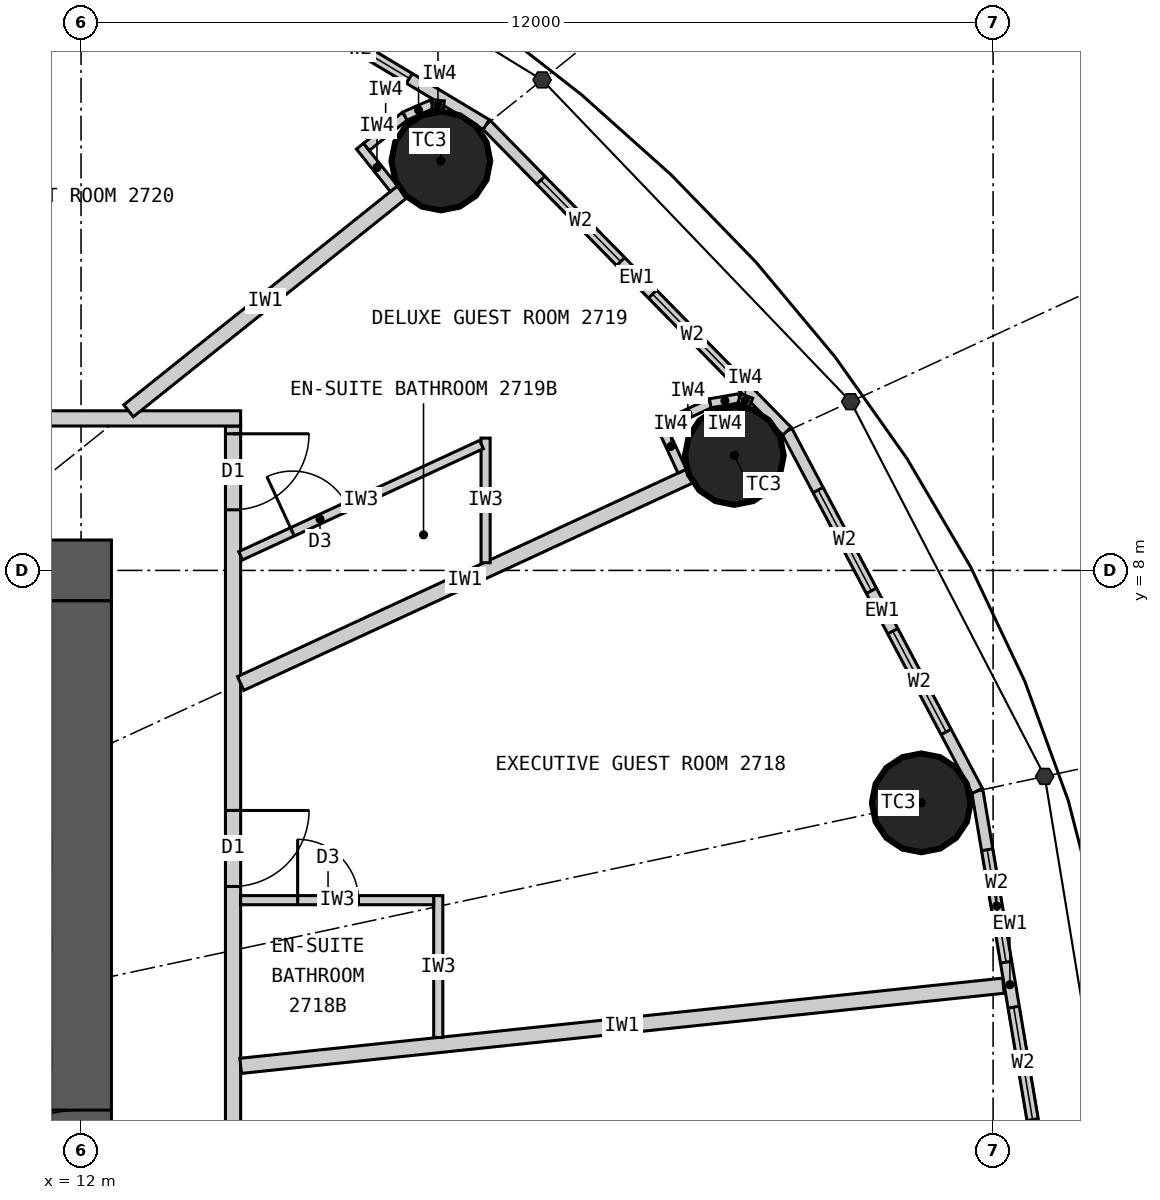
"""IFC4 building model, lengths in metres.
Left out: names, types, materials, properties, quantities, classifications, styles, units other than length and angle.
Written with IfcOpenShell. Run it as: python <this file> out.ifc"""

import sys

from ifc_helpers import new_model, si_unit, direction, frame, frame_2d, origin, origin_2d, place, context, subcontext, project, spatial, rectangle, circle, extrude, element, fill, save


model = new_model("IFC4")
c1 = context("Model", 3, precision=1e-05, world=origin(), true_north=direction((0.0, 1.0)))
c2 = subcontext(c1, "Body", "Model", "MODEL_VIEW")
j1 = project(units=[si_unit("LENGTHUNIT", "METRE"), si_unit("PLANEANGLEUNIT", "RADIAN")], contexts=[c1])
p1 = place(None, origin())
s1 = spatial("IfcSite", under=j1, at=p1, CompositionType="ELEMENT")
p2 = place(p1, origin())
s2 = spatial("IfcBuilding", under=s1, at=p2, CompositionType="ELEMENT")
p3 = place(p2, frame((0.0, 0.0, 108.9)))
s3 = spatial("IfcBuildingStorey", under=s2, at=p3, CompositionType="ELEMENT", Elevation=108.9)
for number, where, z_axis, x_axis in (
    (1, (23.055, 4.942, 0.0), (0.0, 0.0, 1.0), (1.0, 0.0, 0.0)),
    (2, (20.596, 9.513, 0.0), (0.0, 0.0, 1.0), (1.0, 0.0, 0.0)),
    (3, (16.734, 13.387, 0.0), (0.0, 0.0, 1.0), (1.0, 0.0, 0.0)),
):
    element("IfcColumn", number, at=place(p3, frame(where, z_axis=z_axis, x_axis=x_axis)), inside=s3, PredefinedType="COLUMN", context=c2, shape_type="SweptSolid", body=[
        extrude(circle(Radius=0.65, at=origin_2d()), origin(), (0.0, 0.0, 1.0), 3.3),
    ])
p4 = place(p3, frame((-12.4, 8.0, 0.0), z_axis=(0.0, 0.0, 1.0), x_axis=(1.0, 0.0, 0.0)))
e4 = element("IfcWall", 4, at=p4, inside=s3, PredefinedType="SHEAR", context=c2, shape_type="SweptSolid", body=[
    extrude(rectangle(XDim=24.8, YDim=0.8, at=frame_2d((12.4, 0.0))), origin(), (0.0, 0.0, 1.0), 3.3),
])
p5 = place(p4, frame((11.1, 0.0, 0.0)))
e5 = element("IfcOpeningElement", 5, at=p5, cuts=e4, PredefinedType="OPENING", context=c2, shape_type="SweptSolid", body=[
    extrude(rectangle(XDim=1.2, YDim=2.2, at=frame_2d((0.6, 1.1))), frame((0.0, 0.41, 0.0), z_axis=(0.0, -1.0, 0.0), x_axis=(1.0, 0.0, 0.0)), (0.0, 0.0, 1.0), 0.82),
])
p6 = place(p4, frame((18.7, 0.0, 0.0)))
e6 = element("IfcOpeningElement", 6, at=p6, cuts=e4, PredefinedType="OPENING", context=c2, shape_type="SweptSolid", body=[
    extrude(rectangle(XDim=0.9, YDim=2.2, at=frame_2d((0.45, 1.1))), frame((0.0, 0.41, 0.0), z_axis=(0.0, -1.0, 0.0), x_axis=(1.0, 0.0, 0.0)), (0.0, 0.0, 1.0), 0.82),
])
p7 = place(p3, frame((12.0, -7.6, 0.0), z_axis=(0.0, 0.0, 1.0), x_axis=(0.0, 1.0, 0.0)))
e7 = element("IfcWall", 7, at=p7, inside=s3, PredefinedType="SHEAR", context=c2, shape_type="SweptSolid", body=[
    extrude(rectangle(XDim=15.2, YDim=0.8, at=frame_2d((7.6, 0.0))), origin(), (0.0, 0.0, 1.0), 3.3),
])
p8 = place(p7, frame((6.7, 0.0, 0.0)))
e8 = element("IfcOpeningElement", 8, at=p8, cuts=e7, PredefinedType="OPENING", context=c2, shape_type="SweptSolid", body=[
    extrude(rectangle(XDim=1.8, YDim=2.2, at=frame_2d((0.9, 1.1))), frame((0.0, 0.41, 0.0), z_axis=(0.0, -1.0, 0.0), x_axis=(1.0, 0.0, 0.0)), (0.0, 0.0, 1.0), 0.82),
])
p9 = place(p3, frame((24.65, 0.0, 0.0), z_axis=(0.0, 0.0, 1.0), x_axis=(-0.165883894218, 0.986145290329, 0.0)))
e9 = element("IfcWall", 9, at=p9, inside=s3, PredefinedType="ELEMENTEDWALL", context=c2, shape_type="SweptSolid", body=[
    extrude(rectangle(XDim=5.172, YDim=0.15, at=frame_2d((2.586, 0.0))), origin(), (0.0, 0.0, 1.0), 3.12),
])
p10 = place(p9, frame((0.786, 0.0, 0.9)))
e10 = element("IfcOpeningElement", 10, at=p10, cuts=e9, PredefinedType="OPENING", context=c2, shape_type="SweptSolid", body=[
    extrude(rectangle(XDim=1.5, YDim=1.9, at=frame_2d((0.75, 0.95))), frame((0.0, 0.085, 0.0), z_axis=(0.0, -1.0, 0.0), x_axis=(1.0, 0.0, 0.0)), (0.0, 0.0, 1.0), 0.17),
])
p11 = place(p9, frame((2.886, 0.0, 0.9)))
e11 = element("IfcOpeningElement", 11, at=p11, cuts=e9, PredefinedType="OPENING", context=c2, shape_type="SweptSolid", body=[
    extrude(rectangle(XDim=1.5, YDim=1.9, at=frame_2d((0.75, 0.95))), frame((0.0, 0.085, 0.0), z_axis=(0.0, -1.0, 0.0), x_axis=(1.0, 0.0, 0.0)), (0.0, 0.0, 1.0), 0.17),
])
p12 = place(p3, frame((23.792, 5.1, 0.0), z_axis=(0.0, 0.0, 1.0), x_axis=(-0.467814388454, 0.883826735257, 0.0)))
e12 = element("IfcWall", 12, at=p12, inside=s3, PredefinedType="ELEMENTEDWALL", context=c2, shape_type="SweptSolid", body=[
    extrude(rectangle(XDim=5.354, YDim=0.15, at=frame_2d((2.677, 0.0))), origin(), (0.0, 0.0, 1.0), 3.12),
])
p13 = place(p12, frame((0.877, 0.0, 0.9)))
e13 = element("IfcOpeningElement", 13, at=p13, cuts=e12, PredefinedType="OPENING", context=c2, shape_type="SweptSolid", body=[
    extrude(rectangle(XDim=1.5, YDim=1.9, at=frame_2d((0.75, 0.95))), frame((0.0, 0.085, 0.0), z_axis=(0.0, -1.0, 0.0), x_axis=(1.0, 0.0, 0.0)), (0.0, 0.0, 1.0), 0.17),
])
p14 = place(p12, frame((2.977, 0.0, 0.9)))
e14 = element("IfcOpeningElement", 14, at=p14, cuts=e12, PredefinedType="OPENING", context=c2, shape_type="SweptSolid", body=[
    extrude(rectangle(XDim=1.5, YDim=1.9, at=frame_2d((0.75, 0.95))), frame((0.0, 0.085, 0.0), z_axis=(0.0, -1.0, 0.0), x_axis=(1.0, 0.0, 0.0)), (0.0, 0.0, 1.0), 0.17),
])
p15 = place(p3, frame((21.287, 9.832, 0.0), z_axis=(0.0, 0.0, 1.0), x_axis=(-0.700136650834, 0.714008872605, 0.0)))
e15 = element("IfcWall", 15, at=p15, inside=s3, PredefinedType="ELEMENTEDWALL", context=c2, shape_type="SweptSolid", body=[
    extrude(rectangle(XDim=5.649, YDim=0.15, at=frame_2d((2.825, 0.0))), origin(), (0.0, 0.0, 1.0), 3.12),
])
p16 = place(p15, frame((1.025, 0.0, 0.9)))
e16 = element("IfcOpeningElement", 16, at=p16, cuts=e15, PredefinedType="OPENING", context=c2, shape_type="SweptSolid", body=[
    extrude(rectangle(XDim=1.5, YDim=1.9, at=frame_2d((0.75, 0.95))), frame((0.0, 0.085, 0.0), z_axis=(0.0, -1.0, 0.0), x_axis=(1.0, 0.0, 0.0)), (0.0, 0.0, 1.0), 0.17),
])
p17 = place(p15, frame((3.125, 0.0, 0.9)))
e17 = element("IfcOpeningElement", 17, at=p17, cuts=e15, PredefinedType="OPENING", context=c2, shape_type="SweptSolid", body=[
    extrude(rectangle(XDim=1.5, YDim=1.9, at=frame_2d((0.75, 0.95))), frame((0.0, 0.085, 0.0), z_axis=(0.0, -1.0, 0.0), x_axis=(1.0, 0.0, 0.0)), (0.0, 0.0, 1.0), 0.17),
])
p18 = place(p3, frame((17.332, 13.866, 0.0), z_axis=(0.0, 0.0, 1.0), x_axis=(-0.857308573723, 0.514802884044, 0.0)))
e18 = element("IfcWall", 18, at=p18, inside=s3, PredefinedType="ELEMENTEDWALL", context=c2, shape_type="SweptSolid", body=[
    extrude(rectangle(XDim=5.961, YDim=0.15, at=frame_2d((2.98, 0.0))), origin(), (0.0, 0.0, 1.0), 3.12),
])
p19 = place(p18, frame((1.181, 0.0, 0.9)))
e19 = element("IfcOpeningElement", 19, at=p19, cuts=e18, PredefinedType="OPENING", context=c2, shape_type="SweptSolid", body=[
    extrude(rectangle(XDim=1.5, YDim=1.9, at=frame_2d((0.75, 0.95))), frame((0.0, 0.085, 0.0), z_axis=(0.0, -1.0, 0.0), x_axis=(1.0, 0.0, 0.0)), (0.0, 0.0, 1.0), 0.17),
])
p20 = place(p18, frame((3.281, 0.0, 0.9)))
e20 = element("IfcOpeningElement", 20, at=p20, cuts=e18, PredefinedType="OPENING", context=c2, shape_type="SweptSolid", body=[
    extrude(rectangle(XDim=1.5, YDim=1.9, at=frame_2d((0.75, 0.95))), frame((0.0, 0.085, 0.0), z_axis=(0.0, -1.0, 0.0), x_axis=(1.0, 0.0, 0.0)), (0.0, 0.0, 1.0), 0.17),
])
p21 = place(p3, frame((14.0, -9.9, 0.0), z_axis=(0.0, 0.0, 1.0), x_axis=(0.0, 1.0, 0.0)))
e21 = element("IfcWall", 21, at=p21, inside=s3, PredefinedType="PARTITIONING", context=c2, shape_type="SweptSolid", body=[
    extrude(rectangle(XDim=19.8, YDim=0.2, at=frame_2d((9.9, 0.0))), origin(), (0.0, 0.0, 1.0), 3.12),
])
p22 = place(p21, frame((3.318, 0.0, 0.0)))
e22 = element("IfcOpeningElement", 22, at=p22, cuts=e21, PredefinedType="OPENING", context=c2, shape_type="SweptSolid", body=[
    extrude(rectangle(XDim=1.0, YDim=2.2, at=frame_2d((0.5, 1.1))), frame((0.0, 0.11, 0.0), z_axis=(0.0, -1.0, 0.0), x_axis=(1.0, 0.0, 0.0)), (0.0, 0.0, 1.0), 0.22),
])
p23 = place(p21, frame((9.238, 0.0, 0.0)))
e23 = element("IfcOpeningElement", 23, at=p23, cuts=e21, PredefinedType="OPENING", context=c2, shape_type="SweptSolid", body=[
    extrude(rectangle(XDim=1.0, YDim=2.2, at=frame_2d((0.5, 1.1))), frame((0.0, 0.11, 0.0), z_axis=(0.0, -1.0, 0.0), x_axis=(1.0, 0.0, 0.0)), (0.0, 0.0, 1.0), 0.22),
])
p24 = place(p21, frame((13.742, 0.0, 0.0)))
e24 = element("IfcOpeningElement", 24, at=p24, cuts=e21, PredefinedType="OPENING", context=c2, shape_type="SweptSolid", body=[
    extrude(rectangle(XDim=1.0, YDim=2.2, at=frame_2d((0.5, 1.1))), frame((0.0, 0.11, 0.0), z_axis=(0.0, -1.0, 0.0), x_axis=(1.0, 0.0, 0.0)), (0.0, 0.0, 1.0), 0.22),
])
p25 = place(p21, frame((18.698, 0.0, 0.0)))
e25 = element("IfcOpeningElement", 25, at=p25, cuts=e21, PredefinedType="OPENING", context=c2, shape_type="SweptSolid", body=[
    extrude(rectangle(XDim=1.0, YDim=2.2, at=frame_2d((0.5, 1.1))), frame((0.0, 0.11, 0.0), z_axis=(0.0, -1.0, 0.0), x_axis=(1.0, 0.0, 0.0)), (0.0, 0.0, 1.0), 0.22),
])
p26 = place(p3, frame((5.139, 10.0, 0.0), z_axis=(0.0, 0.0, 1.0), x_axis=(1.0, 0.0, 0.0)))
e26 = element("IfcWall", 26, at=p26, inside=s3, PredefinedType="PARTITIONING", context=c2, shape_type="SweptSolid", body=[
    extrude(rectangle(XDim=8.961, YDim=0.2, at=frame_2d((4.48, 0.0))), origin(), (0.0, 0.0, 1.0), 3.12),
])
p27 = place(p3, frame((14.1, 1.482, 0.0), z_axis=(0.0, 0.0, 1.0), x_axis=(0.994523202615, 0.104516024894, 0.0)))
e27 = element("IfcWall", 27, at=p27, inside=s3, PredefinedType="PARTITIONING", context=c2, shape_type="SweptSolid", body=[
    extrude(rectangle(XDim=10.091, YDim=0.2, at=frame_2d((5.045, 0.0))), origin(), (0.0, 0.0, 1.0), 2.47),
])
p28 = place(p3, frame((14.1, 6.512, 0.0), z_axis=(0.0, 0.0, 1.0), x_axis=(0.907833019998, 0.419331858797, 0.0)))
e28 = element("IfcWall", 28, at=p28, inside=s3, PredefinedType="PARTITIONING", context=c2, shape_type="SweptSolid", body=[
    extrude(rectangle(XDim=6.505, YDim=0.2, at=frame_2d((3.252, 0.0))), origin(), (0.0, 0.0, 1.0), 2.27),
])
p29 = place(p3, frame((12.625, 10.1, 0.0), z_axis=(0.0, 0.0, 1.0), x_axis=(0.780863644897, 0.624701503182, 0.0)))
e29 = element("IfcWall", 29, at=p29, inside=s3, PredefinedType="PARTITIONING", context=c2, shape_type="SweptSolid", body=[
    extrude(rectangle(XDim=4.612, YDim=0.2, at=frame_2d((2.306, 0.0))), origin(), (0.0, 0.0, 1.0), 2.37),
])
p30 = place(p3, frame((16.7, 1.855, 0.0), z_axis=(0.0, 0.0, 1.0), x_axis=(0.0, 1.0, 0.0)))
e30 = element("IfcWall", 30, at=p30, inside=s3, PredefinedType="PARTITIONING", context=c2, shape_type="SweptSolid", body=[
    extrude(rectangle(XDim=1.867, YDim=0.12, at=frame_2d((0.933, 0.0))), origin(), (0.0, 0.0, 1.0), 3.12),
])
p31 = place(p3, frame((14.1, 3.662, 0.0), z_axis=(0.0, 0.0, 1.0), x_axis=(1.0, 0.0, 0.0)))
e31 = element("IfcWall", 31, at=p31, inside=s3, PredefinedType="PARTITIONING", context=c2, shape_type="SweptSolid", body=[
    extrude(rectangle(XDim=2.54, YDim=0.12, at=frame_2d((1.27, 0.0))), origin(), (0.0, 0.0, 1.0), 2.37),
])
p32 = place(p31, frame((0.75, 0.0, 0.0)))
e32 = element("IfcOpeningElement", 32, at=p32, cuts=e31, PredefinedType="OPENING", context=c2, shape_type="SweptSolid", body=[
    extrude(rectangle(XDim=0.8, YDim=2.1, at=frame_2d((0.4, 1.05))), frame((0.0, 0.07, 0.0), z_axis=(0.0, -1.0, 0.0), x_axis=(1.0, 0.0, 0.0)), (0.0, 0.0, 1.0), 0.14),
])
p33 = place(p3, frame((17.323, 8.101, 0.0), z_axis=(0.0, 0.0, 1.0), x_axis=(0.0, 1.0, 0.0)))
e33 = element("IfcWall", 33, at=p33, inside=s3, PredefinedType="PARTITIONING", context=c2, shape_type="SweptSolid", body=[
    extrude(rectangle(XDim=1.64, YDim=0.12, at=frame_2d((0.82, 0.0))), origin(), (0.0, 0.0, 1.0), 3.12),
])
p34 = place(p3, frame((14.1, 8.193, 0.0), z_axis=(0.0, 0.0, 1.0), x_axis=(0.907836493557, 0.419324338628, 0.0)))
e34 = element("IfcWall", 34, at=p34, inside=s3, PredefinedType="PARTITIONING", context=c2, shape_type="SweptSolid", body=[
    extrude(rectangle(XDim=3.49, YDim=0.12, at=frame_2d((1.745, 0.0))), origin(), (0.0, 0.0, 1.0), 3.12),
])
p35 = place(p34, frame((0.75, 0.0, 0.0)))
e35 = element("IfcOpeningElement", 35, at=p35, cuts=e34, PredefinedType="OPENING", context=c2, shape_type="SweptSolid", body=[
    extrude(rectangle(XDim=0.8, YDim=2.1, at=frame_2d((0.4, 1.05))), frame((0.0, 0.07, 0.0), z_axis=(0.0, -1.0, 0.0), x_axis=(1.0, 0.0, 0.0)), (0.0, 0.0, 1.0), 0.14),
])
p36 = place(p3, frame((19.909, 9.306, 0.0), z_axis=(0.0, 0.0, 1.0), x_axis=(-0.419296148934, 0.90784951368, 0.0)))
e36 = element("IfcWall", 36, at=p36, inside=s3, PredefinedType="PARTITIONING", context=c2, shape_type="SweptSolid", body=[
    extrude(rectangle(XDim=0.716, YDim=0.12, at=frame_2d((0.358, 0.0))), origin(), (0.0, 0.0, 1.0), 3.12),
])
p37 = place(p3, frame((19.689, 9.926, 0.0), z_axis=(0.0, 0.0, 1.0), x_axis=(0.907893409272, 0.419201094227, 0.0)))
e37 = element("IfcWall", 37, at=p37, inside=s3, PredefinedType="PARTITIONING", context=c2, shape_type="SweptSolid", body=[
    extrude(rectangle(XDim=0.65, YDim=0.12, at=frame_2d((0.325, 0.0))), origin(), (0.0, 0.0, 1.0), 3.12),
])
p38 = place(p3, frame((20.279, 10.199, 0.0), z_axis=(0.0, 0.0, 1.0), x_axis=(0.985380740712, 0.170366651181, 0.0)))
e38 = element("IfcWall", 38, at=p38, inside=s3, PredefinedType="PARTITIONING", context=c2, shape_type="SweptSolid", body=[
    extrude(rectangle(XDim=0.391, YDim=0.12, at=frame_2d((0.196, 0.0))), origin(), (0.0, 0.0, 1.0), 3.12),
])
p39 = place(p3, frame((20.664, 10.265, 0.0), z_axis=(0.0, 0.0, 1.0), x_axis=(0.938058651481, -0.346476501918, 0.0)))
e39 = element("IfcWall", 39, at=p39, inside=s3, PredefinedType="PARTITIONING", context=c2, shape_type="SweptSolid", body=[
    extrude(rectangle(XDim=0.161, YDim=0.12, at=frame_2d((0.081, 0.0))), origin(), (0.0, 0.0, 1.0), 3.12),
])
p40 = place(p3, frame((16.117, 13.022, 0.0), z_axis=(0.0, 0.0, 1.0), x_axis=(-0.62465344249, 0.780902091677, 0.0)))
e40 = element("IfcWall", 40, at=p40, inside=s3, PredefinedType="PARTITIONING", context=c2, shape_type="SweptSolid", body=[
    extrude(rectangle(XDim=0.716, YDim=0.12, at=frame_2d((0.358, 0.0))), origin(), (0.0, 0.0, 1.0), 3.12),
])
p41 = place(p3, frame((15.754, 13.571, 0.0), z_axis=(0.0, 0.0, 1.0), x_axis=(0.780905453553, 0.624649239663, 0.0)))
e41 = element("IfcWall", 41, at=p41, inside=s3, PredefinedType="PARTITIONING", context=c2, shape_type="SweptSolid", body=[
    extrude(rectangle(XDim=0.65, YDim=0.12, at=frame_2d((0.325, 0.0))), origin(), (0.0, 0.0, 1.0), 3.12),
])
p42 = place(p3, frame((16.262, 13.977, 0.0), z_axis=(0.0, 0.0, 1.0), x_axis=(0.915985403703, 0.401211590314, 0.0)))
e42 = element("IfcWall", 42, at=p42, inside=s3, PredefinedType="PARTITIONING", context=c2, shape_type="SweptSolid", body=[
    extrude(rectangle(XDim=0.391, YDim=0.12, at=frame_2d((0.196, 0.0))), origin(), (0.0, 0.0, 1.0), 3.12),
])
p43 = place(p3, frame((16.62, 14.134, 0.0), z_axis=(0.0, 0.0, 1.0), x_axis=(0.993941871493, -0.109907033867, 0.0)))
e43 = element("IfcWall", 43, at=p43, inside=s3, PredefinedType="PARTITIONING", context=c2, shape_type="SweptSolid", body=[
    extrude(rectangle(XDim=0.153, YDim=0.12, at=frame_2d((0.077, 0.0))), origin(), (0.0, 0.0, 1.0), 3.12),
])
p44 = place(p10, origin())
e44 = element("IfcWindow", 44, at=p44, inside=s3, PartitioningType="SINGLE_PANEL", PredefinedType="WINDOW", context=c2, shape_type="SweptSolid", body=[
    extrude(rectangle(XDim=1.5, YDim=1.9, at=frame_2d((0.75, 0.95))), frame((0.0, 0.03, 0.0), z_axis=(0.0, -1.0, 0.0), x_axis=(1.0, 0.0, 0.0)), (0.0, 0.0, 1.0), 0.06),
])
fill(e10, e44)
p45 = place(p11, origin())
e45 = element("IfcWindow", 45, at=p45, inside=s3, PartitioningType="SINGLE_PANEL", PredefinedType="WINDOW", context=c2, shape_type="SweptSolid", body=[
    extrude(rectangle(XDim=1.5, YDim=1.9, at=frame_2d((0.75, 0.95))), frame((0.0, 0.03, 0.0), z_axis=(0.0, -1.0, 0.0), x_axis=(1.0, 0.0, 0.0)), (0.0, 0.0, 1.0), 0.06),
])
fill(e11, e45)
p46 = place(p13, origin())
e46 = element("IfcWindow", 46, at=p46, inside=s3, PartitioningType="SINGLE_PANEL", PredefinedType="WINDOW", context=c2, shape_type="SweptSolid", body=[
    extrude(rectangle(XDim=1.5, YDim=1.9, at=frame_2d((0.75, 0.95))), frame((0.0, 0.03, 0.0), z_axis=(0.0, -1.0, 0.0), x_axis=(1.0, 0.0, 0.0)), (0.0, 0.0, 1.0), 0.06),
])
fill(e13, e46)
p47 = place(p14, origin())
e47 = element("IfcWindow", 47, at=p47, inside=s3, PartitioningType="SINGLE_PANEL", PredefinedType="WINDOW", context=c2, shape_type="SweptSolid", body=[
    extrude(rectangle(XDim=1.5, YDim=1.9, at=frame_2d((0.75, 0.95))), frame((0.0, 0.03, 0.0), z_axis=(0.0, -1.0, 0.0), x_axis=(1.0, 0.0, 0.0)), (0.0, 0.0, 1.0), 0.06),
])
fill(e14, e47)
p48 = place(p16, origin())
e48 = element("IfcWindow", 48, at=p48, inside=s3, PartitioningType="SINGLE_PANEL", PredefinedType="WINDOW", context=c2, shape_type="SweptSolid", body=[
    extrude(rectangle(XDim=1.5, YDim=1.9, at=frame_2d((0.75, 0.95))), frame((0.0, 0.03, 0.0), z_axis=(0.0, -1.0, 0.0), x_axis=(1.0, 0.0, 0.0)), (0.0, 0.0, 1.0), 0.06),
])
fill(e16, e48)
p49 = place(p17, origin())
e49 = element("IfcWindow", 49, at=p49, inside=s3, PartitioningType="SINGLE_PANEL", PredefinedType="WINDOW", context=c2, shape_type="SweptSolid", body=[
    extrude(rectangle(XDim=1.5, YDim=1.9, at=frame_2d((0.75, 0.95))), frame((0.0, 0.03, 0.0), z_axis=(0.0, -1.0, 0.0), x_axis=(1.0, 0.0, 0.0)), (0.0, 0.0, 1.0), 0.06),
])
fill(e17, e49)
p50 = place(p19, origin())
e50 = element("IfcWindow", 50, at=p50, inside=s3, PartitioningType="SINGLE_PANEL", PredefinedType="WINDOW", context=c2, shape_type="SweptSolid", body=[
    extrude(rectangle(XDim=1.5, YDim=1.9, at=frame_2d((0.75, 0.95))), frame((0.0, 0.03, 0.0), z_axis=(0.0, -1.0, 0.0), x_axis=(1.0, 0.0, 0.0)), (0.0, 0.0, 1.0), 0.06),
])
fill(e19, e50)
p51 = place(p32, origin())
e51 = element("IfcDoor", 51, at=p51, inside=s3, OperationType="SINGLE_SWING_LEFT", PredefinedType="DOOR", context=c2, shape_type="SweptSolid", body=[
    extrude(rectangle(XDim=0.8, YDim=2.1, at=frame_2d((0.4, 1.05))), frame((0.0, 0.025, 0.0), z_axis=(0.0, -1.0, 0.0), x_axis=(1.0, 0.0, 0.0)), (0.0, 0.0, 1.0), 0.05),
])
fill(e32, e51)
p52 = place(p24, origin())
e52 = element("IfcDoor", 52, at=p52, inside=s3, OperationType="SINGLE_SWING_RIGHT", PredefinedType="DOOR", context=c2, shape_type="SweptSolid", body=[
    extrude(rectangle(XDim=1.0, YDim=2.2, at=frame_2d((0.5, 1.1))), frame((0.0, 0.025, 0.0), z_axis=(0.0, -1.0, 0.0), x_axis=(1.0, 0.0, 0.0)), (0.0, 0.0, 1.0), 0.05),
])
fill(e24, e52)
p53 = place(p35, origin())
e53 = element("IfcDoor", 53, at=p53, inside=s3, OperationType="SINGLE_SWING_LEFT", PredefinedType="DOOR", context=c2, shape_type="SweptSolid", body=[
    extrude(rectangle(XDim=0.8, YDim=2.1, at=frame_2d((0.4, 1.05))), frame((0.0, 0.025, 0.0), z_axis=(0.0, -1.0, 0.0), x_axis=(1.0, 0.0, 0.0)), (0.0, 0.0, 1.0), 0.05),
])
fill(e35, e53)
p54 = place(p25, origin())
e54 = element("IfcDoor", 54, at=p54, inside=s3, OperationType="SINGLE_SWING_RIGHT", PredefinedType="DOOR", context=c2, shape_type="SweptSolid", body=[
    extrude(rectangle(XDim=1.0, YDim=2.2, at=frame_2d((0.5, 1.1))), frame((0.0, 0.025, 0.0), z_axis=(0.0, -1.0, 0.0), x_axis=(1.0, 0.0, 0.0)), (0.0, 0.0, 1.0), 0.05),
])
fill(e25, e54)
p55 = place(p8, origin())
e55 = element("IfcDoor", 55, at=p55, inside=s3, OperationType="DOUBLE_DOOR_DOUBLE_SWING", PredefinedType="DOOR", context=c2, shape_type="SweptSolid", body=[
    extrude(rectangle(XDim=1.8, YDim=2.2, at=frame_2d((0.9, 1.1))), frame((0.0, 0.025, 0.0), z_axis=(0.0, -1.0, 0.0), x_axis=(1.0, 0.0, 0.0)), (0.0, 0.0, 1.0), 0.05),
])
fill(e8, e55)
save(model, sys.argv[1])
